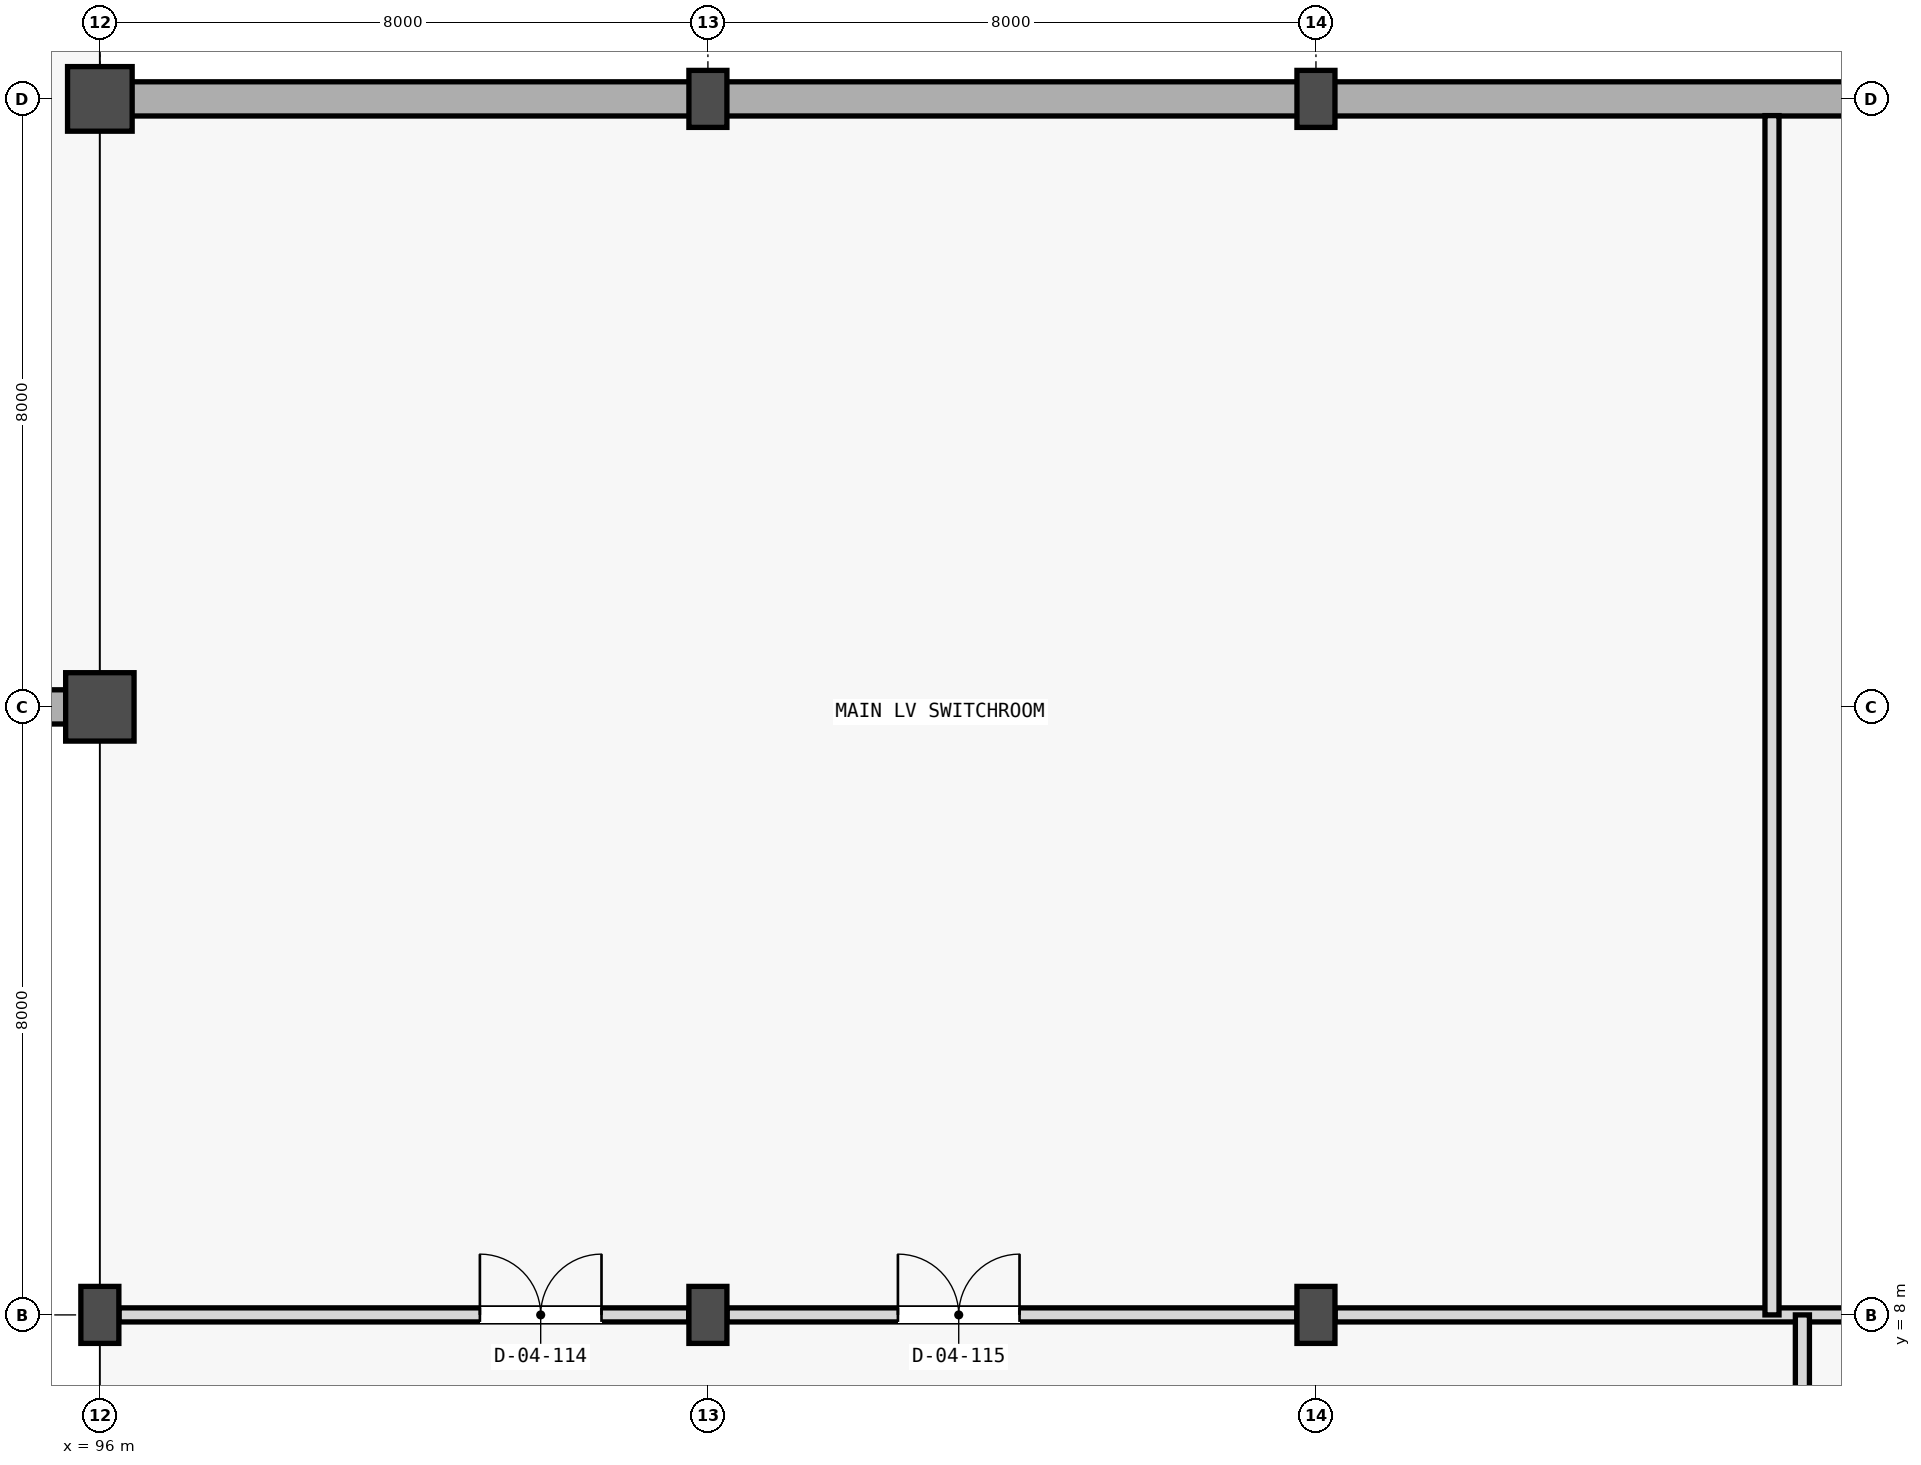
"""IFC4 building model, lengths in metres.
Left out: names, types, materials, properties, quantities, classifications, styles, units other than length and angle.
Written with IfcOpenShell. Run it as: python <this file> out.ifc"""

import sys

from ifc_helpers import new_model, si_unit, direction, frame, frame_2d, origin, origin_2d, place, context, subcontext, project, spatial, rectangle, extrude, element, fill, save


model = new_model("IFC4")
c1 = context("Model", 3, precision=1e-05, world=origin(), true_north=direction((0.0, 1.0)))
c2 = subcontext(c1, "Body", "Model", "MODEL_VIEW")
j1 = project(units=[si_unit("LENGTHUNIT", "METRE"), si_unit("PLANEANGLEUNIT", "RADIAN")], contexts=[c1])
p1 = place(None, origin())
s1 = spatial("IfcSite", under=j1, at=p1, CompositionType="ELEMENT")
p2 = place(p1, origin())
s2 = spatial("IfcBuilding", under=s1, at=p2, CompositionType="ELEMENT")
p3 = place(p2, frame((0.0, 0.0, -4.8)))
s3 = spatial("IfcBuildingStorey", under=s2, at=p3, CompositionType="ELEMENT", Elevation=-4.8)
p4 = place(p3, frame((96.0, 16.0, 0.0), z_axis=(0.0, 0.0, 1.0), x_axis=(1.0, 0.0, 0.0)))
e1 = element("IfcColumn", 1, at=p4, inside=s3, PredefinedType="COLUMN", context=c2, shape_type="SweptSolid", body=[
    extrude(rectangle(XDim=0.9, YDim=0.9, at=origin_2d()), origin(), (0.0, 0.0, 1.0), 4.47),
])
p5 = place(p3, frame((96.0, 24.0, 0.0), z_axis=(0.0, 0.0, 1.0), x_axis=(1.0, 0.0, 0.0)))
e2 = element("IfcColumn", 2, at=p5, inside=s3, PredefinedType="COLUMN", context=c2, shape_type="SweptSolid", body=[
    extrude(rectangle(XDim=0.85, YDim=0.85, at=origin_2d()), origin(), (0.0, 0.0, 1.0), 4.47),
])
for number, where, z_axis, x_axis in (
    (3, (96.0, 8.0, 0.0), (0.0, 0.0, 1.0), (1.0, 0.0, 0.0)),
    (4, (104.0, 8.0, 0.0), (0.0, 0.0, 1.0), (1.0, 0.0, 0.0)),
    (5, (104.0, 24.0, 0.0), (0.0, 0.0, 1.0), (1.0, 0.0, 0.0)),
    (6, (112.0, 8.0, 0.0), (0.0, 0.0, 1.0), (1.0, 0.0, 0.0)),
    (7, (112.0, 24.0, 0.0), (0.0, 0.0, 1.0), (1.0, 0.0, 0.0)),
):
    element("IfcColumn", number, at=place(p3, frame(where, z_axis=z_axis, x_axis=x_axis)), inside=s3, PredefinedType="COLUMN", context=c2, shape_type="SweptSolid", body=[
        extrude(rectangle(XDim=0.5, YDim=0.75, at=origin_2d()), origin(), (0.0, 0.0, 1.0), 4.5),
    ])
p6 = place(p3, frame((79.902, 16.0, 0.0), z_axis=(0.0, 0.0, 1.0), x_axis=(1.0, 0.0, 0.0)))
e8 = element("IfcWall", 8, at=p6, inside=s3, PredefinedType="SOLIDWALL", context=c2, shape_type="SweptSolid", body=[
    extrude(rectangle(XDim=16.098, YDim=0.45, at=frame_2d((8.049, 0.0))), origin(), (0.0, 0.0, 1.0), 4.47),
])
p7 = place(p3, frame((96.0, 24.0, 0.0), z_axis=(0.0, 0.0, 1.0), x_axis=(1.0, 0.0, 0.0)))
e9 = element("IfcWall", 9, at=p7, inside=s3, PredefinedType="SOLIDWALL", context=c2, shape_type="SweptSolid", body=[
    extrude(rectangle(XDim=48.0, YDim=0.45, at=frame_2d((24.0, 0.0))), origin(), (0.0, 0.0, 1.0), 4.47),
])
p8 = place(p3, frame((96.252, 8.0, 0.0), z_axis=(0.0, 0.0, 1.0), x_axis=(1.0, 0.0, 0.0)))
e10 = element("IfcWall", 10, at=p8, inside=s3, PredefinedType="STANDARD", context=c2, shape_type="SweptSolid", body=[
    extrude(rectangle(XDim=7.496, YDim=0.185, at=frame_2d((3.748, 0.0))), origin(), (0.0, 0.0, 1.0), 3.65),
])
p9 = place(p8, frame((4.748, 0.0, 0.0)))
e11 = element("IfcOpeningElement", 11, at=p9, cuts=e10, PredefinedType="OPENING", context=c2, shape_type="SweptSolid", body=[
    extrude(rectangle(XDim=1.6, YDim=2.3, at=frame_2d((0.8, 1.15))), frame((0.0, 0.103, 0.0), z_axis=(0.0, -1.0, 0.0), x_axis=(1.0, 0.0, 0.0)), (0.0, 0.0, 1.0), 0.205),
])
p10 = place(p3, frame((104.252, 8.0, 0.0), z_axis=(0.0, 0.0, 1.0), x_axis=(1.0, 0.0, 0.0)))
e12 = element("IfcWall", 12, at=p10, inside=s3, PredefinedType="STANDARD", context=c2, shape_type="SweptSolid", body=[
    extrude(rectangle(XDim=7.496, YDim=0.185, at=frame_2d((3.748, 0.0))), origin(), (0.0, 0.0, 1.0), 3.65),
])
p11 = place(p10, frame((2.248, 0.0, 0.0)))
e13 = element("IfcOpeningElement", 13, at=p11, cuts=e12, PredefinedType="OPENING", context=c2, shape_type="SweptSolid", body=[
    extrude(rectangle(XDim=1.6, YDim=2.3, at=frame_2d((0.8, 1.15))), frame((0.0, 0.103, 0.0), z_axis=(0.0, -1.0, 0.0), x_axis=(1.0, 0.0, 0.0)), (0.0, 0.0, 1.0), 0.205),
])
p12 = place(p3, frame((112.252, 8.0, 0.0), z_axis=(0.0, 0.0, 1.0), x_axis=(1.0, 0.0, 0.0)))
e14 = element("IfcWall", 14, at=p12, inside=s3, PredefinedType="STANDARD", context=c2, shape_type="SweptSolid", body=[
    extrude(rectangle(XDim=7.496, YDim=0.185, at=frame_2d((3.748, 0.0))), origin(), (0.0, 0.0, 1.0), 3.65),
])
p13 = place(p3, frame((118.4, 0.22, 0.0), z_axis=(0.0, 0.0, 1.0), x_axis=(0.0, 1.0, 0.0)))
e15 = element("IfcWall", 15, at=p13, inside=s3, PredefinedType="STANDARD", context=c2, shape_type="SweptSolid", body=[
    extrude(rectangle(XDim=7.78, YDim=0.185, at=frame_2d((3.89, 0.0))), origin(), (0.0, 0.0, 1.0), 3.65),
])
p14 = place(p3, frame((118.0, 8.0, 0.0), z_axis=(0.0, 0.0, 1.0), x_axis=(0.0, 1.0, 0.0)))
e16 = element("IfcWall", 16, at=p14, inside=s3, PredefinedType="STANDARD", context=c2, shape_type="SweptSolid", body=[
    extrude(rectangle(XDim=15.78, YDim=0.185, at=frame_2d((7.89, 0.0))), origin(), (0.0, 0.0, 1.0), 3.65),
])
p15 = place(p9, origin())
e17 = element("IfcDoor", 17, at=p15, inside=s3, OperationType="DOUBLE_DOOR_SINGLE_SWING", PredefinedType="DOOR", context=c2, shape_type="SweptSolid", body=[
    extrude(rectangle(XDim=1.6, YDim=2.3, at=frame_2d((0.8, 1.15))), frame((0.0, 0.025, 0.0), z_axis=(0.0, -1.0, 0.0), x_axis=(1.0, 0.0, 0.0)), (0.0, 0.0, 1.0), 0.05),
])
fill(e11, e17)
p16 = place(p11, origin())
e18 = element("IfcDoor", 18, at=p16, inside=s3, OperationType="DOUBLE_DOOR_SINGLE_SWING", PredefinedType="DOOR", context=c2, shape_type="SweptSolid", body=[
    extrude(rectangle(XDim=1.6, YDim=2.3, at=frame_2d((0.8, 1.15))), frame((0.0, 0.025, 0.0), z_axis=(0.0, -1.0, 0.0), x_axis=(1.0, 0.0, 0.0)), (0.0, 0.0, 1.0), 0.05),
])
fill(e13, e18)
save(model, sys.argv[1])
